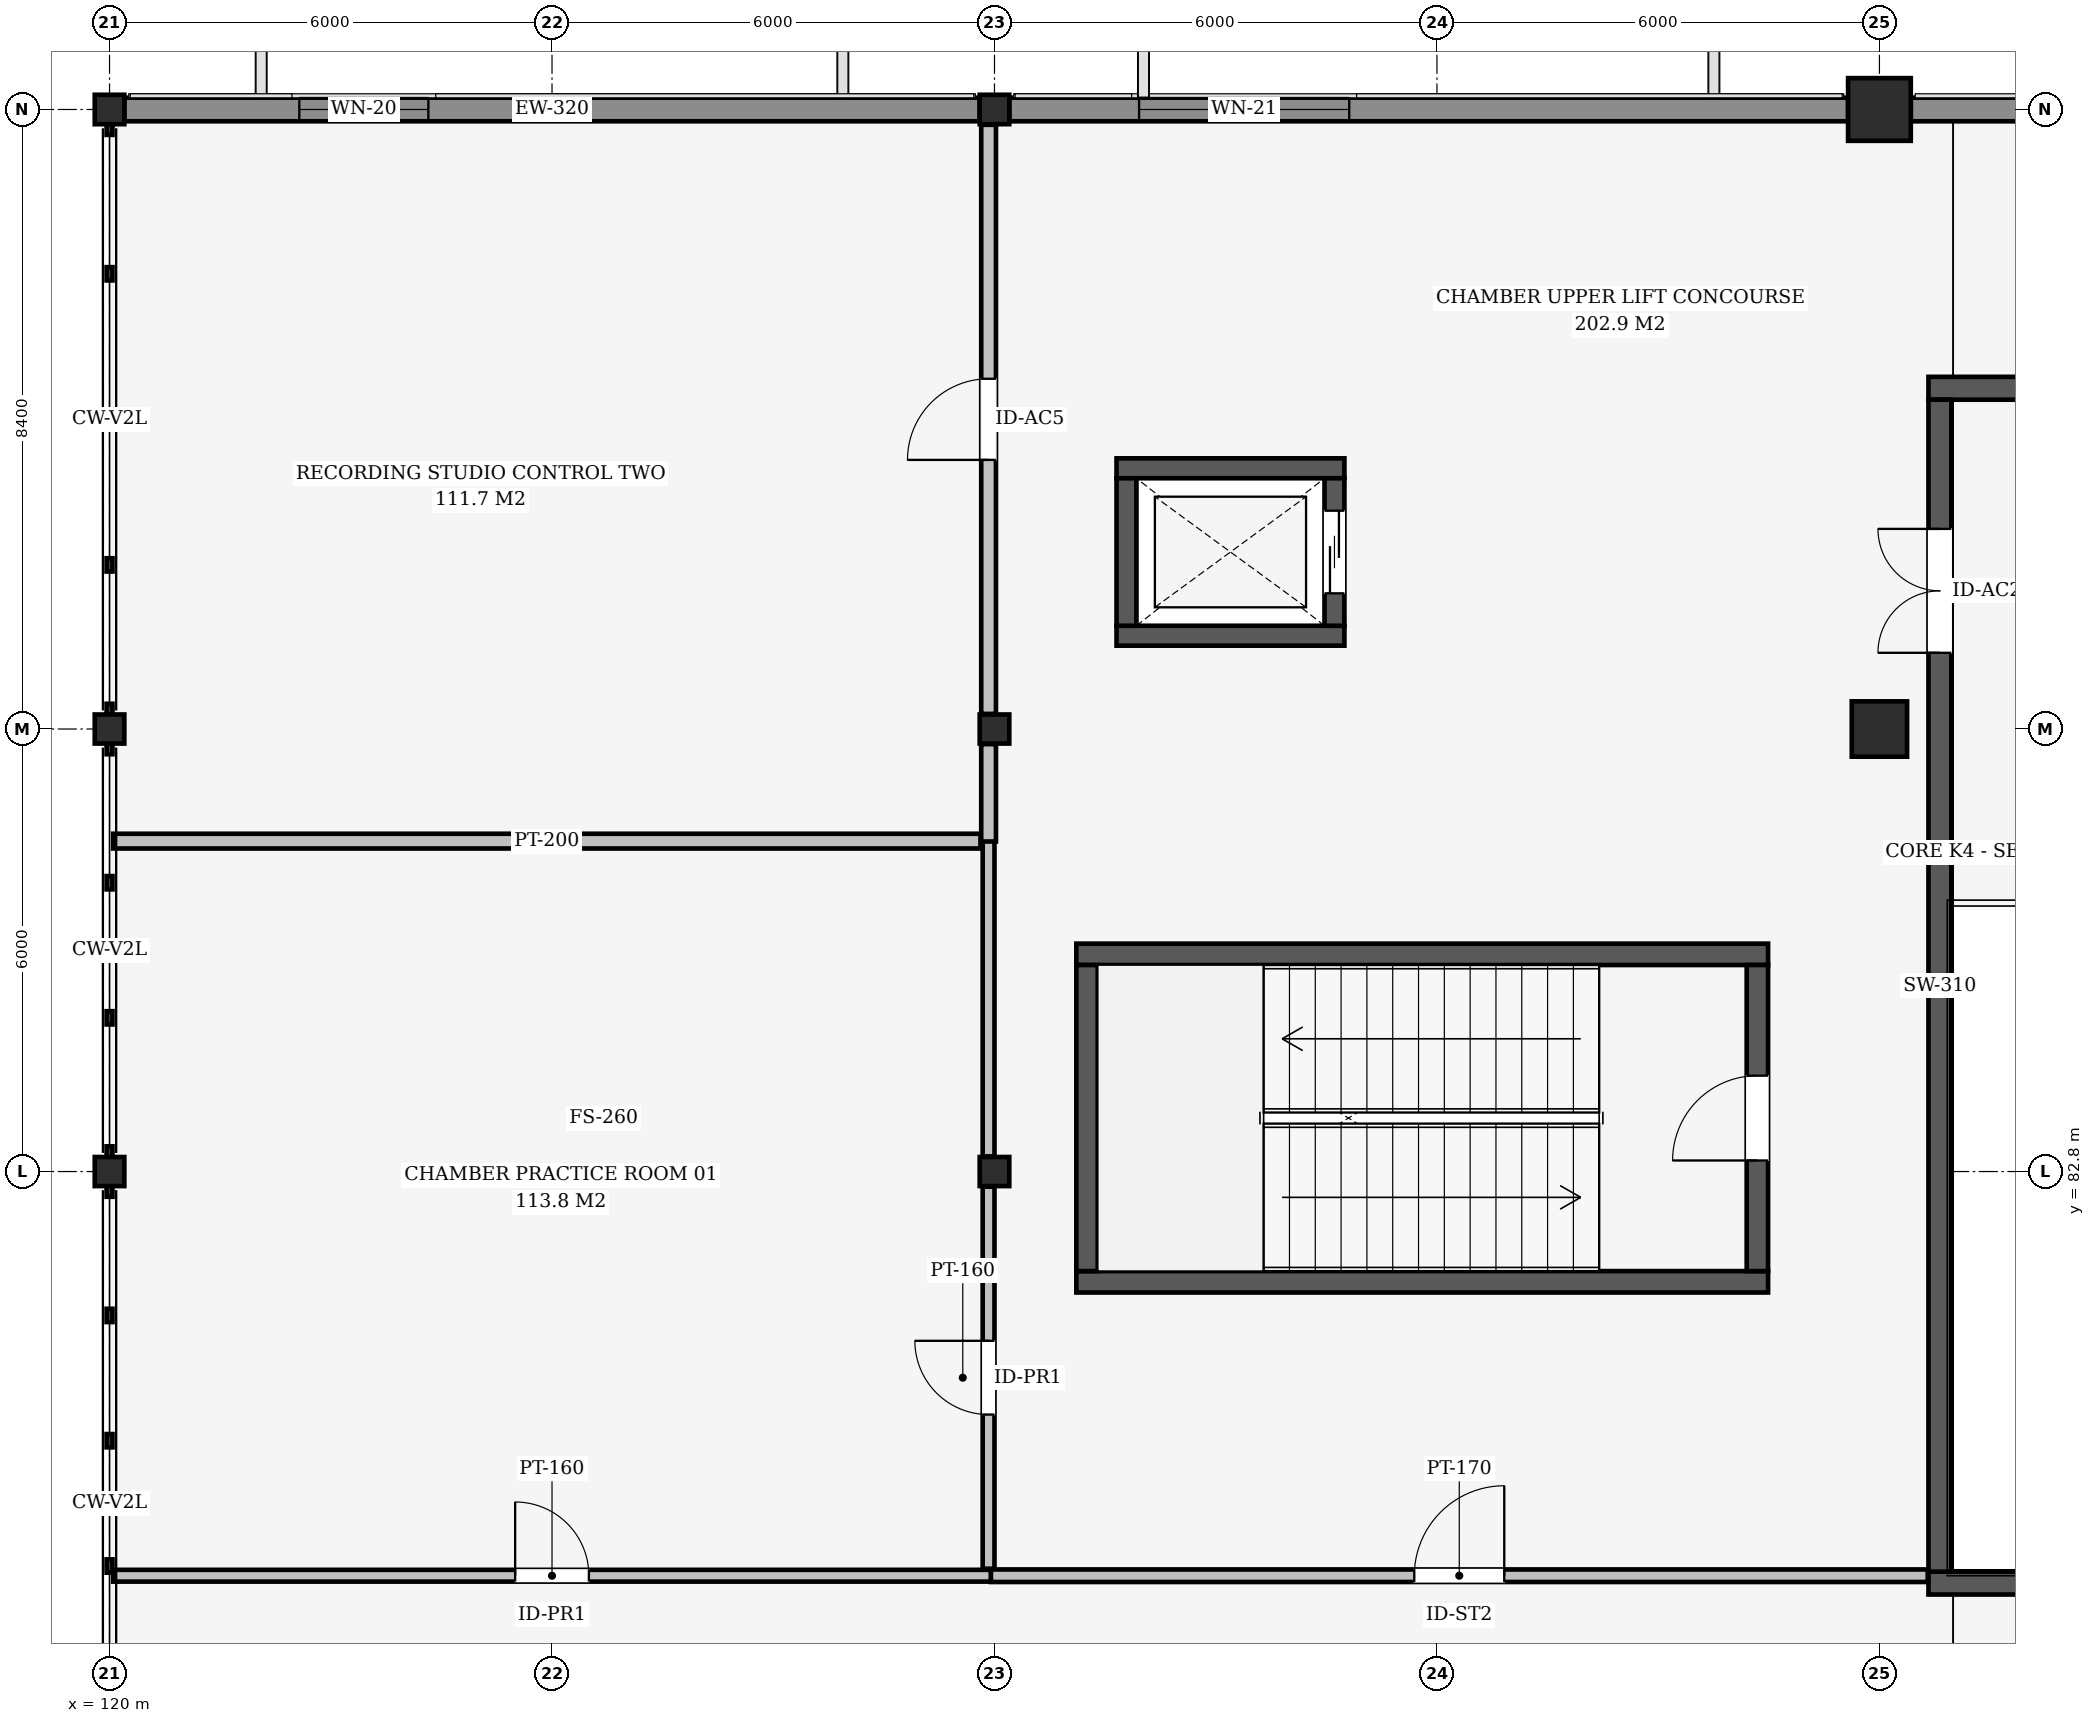
"""IFC4 building model, lengths in metres.
Left out: names, types, materials, properties, quantities, classifications, styles, units other than length and angle.
Written with IfcOpenShell. Run it as: python <this file> out.ifc"""

import sys

from ifc_helpers import new_model, si_unit, direction, frame, frame_2d, origin, origin_2d, place, context, subcontext, project, spatial, rectangle, i_section, extrude, element, fill, save


model = new_model("IFC4")
c1 = context("Model", 3, precision=1e-05, world=origin(), true_north=direction((0.0, 1.0)))
c2 = subcontext(c1, "Body", "Model", "MODEL_VIEW")
j1 = project(units=[si_unit("LENGTHUNIT", "METRE"), si_unit("PLANEANGLEUNIT", "RADIAN")], contexts=[c1])
p1 = place(None, origin())
s1 = spatial("IfcSite", under=j1, at=p1, CompositionType="ELEMENT")
p2 = place(p1, origin())
s2 = spatial("IfcBuilding", under=s1, at=p2, CompositionType="ELEMENT")
p3 = place(p2, frame((0.0, 0.0, 4.8)))
s3 = spatial("IfcBuildingStorey", under=s2, at=p3, CompositionType="ELEMENT", Elevation=4.8)
for number, where, z_axis, x_axis in (
    (1, (120.0, 82.8, 0.0), (0.0, 0.0, 1.0), (1.0, 0.0, 0.0)),
    (2, (120.0, 88.8, 0.0), (0.0, 0.0, 1.0), (1.0, 0.0, 0.0)),
):
    element("IfcColumn", number, at=place(p3, frame(where, z_axis=z_axis, x_axis=x_axis)), inside=s3, PredefinedType="COLUMN", context=c2, shape_type="SweptSolid", body=[
        extrude(i_section(OverallWidth=0.401, OverallDepth=0.394, WebThickness=0.023, FlangeThickness=0.037, at=origin_2d()), origin(), (0.0, 0.0, 1.0), 4.5),
    ])
p4 = place(p3, frame((120.0, 97.2, 0.0), z_axis=(0.0, 0.0, 1.0), x_axis=(1.0, 0.0, 0.0)))
e3 = element("IfcColumn", 3, at=p4, inside=s3, PredefinedType="COLUMN", context=c2, shape_type="SweptSolid", body=[
    extrude(i_section(OverallWidth=0.401, OverallDepth=0.399, WebThickness=0.025, FlangeThickness=0.04, at=origin_2d()), origin(), (0.0, 0.0, 1.0), 4.5),
])
for number, where, z_axis, x_axis in (
    (4, (132.0, 82.8, 0.0), (0.0, 0.0, 1.0), (1.0, 0.0, 0.0)),
    (5, (132.0, 88.8, 0.0), (0.0, 0.0, 1.0), (1.0, 0.0, 0.0)),
):
    element("IfcColumn", number, at=place(p3, frame(where, z_axis=z_axis, x_axis=x_axis)), inside=s3, PredefinedType="COLUMN", context=c2, shape_type="SweptSolid", body=[
        extrude(i_section(OverallWidth=0.401, OverallDepth=0.394, WebThickness=0.023, FlangeThickness=0.037, at=origin_2d()), origin(), (0.0, 0.0, 1.0), 4.5),
    ])
p5 = place(p3, frame((132.0, 97.2, 0.0), z_axis=(0.0, 0.0, 1.0), x_axis=(1.0, 0.0, 0.0)))
e6 = element("IfcColumn", 6, at=p5, inside=s3, PredefinedType="COLUMN", context=c2, shape_type="SweptSolid", body=[
    extrude(i_section(OverallWidth=0.401, OverallDepth=0.399, WebThickness=0.025, FlangeThickness=0.04, at=origin_2d()), origin(), (0.0, 0.0, 1.0), 4.5),
])
p6 = place(p3, frame((144.0, 88.8, 0.0), z_axis=(0.0, 0.0, 1.0), x_axis=(1.0, 0.0, 0.0)))
e7 = element("IfcColumn", 7, at=p6, inside=s3, PredefinedType="COLUMN", context=c2, shape_type="SweptSolid", body=[
    extrude(rectangle(XDim=0.75, YDim=0.75, at=origin_2d()), origin(), (0.0, 0.0, 1.0), 4.5),
])
p7 = place(p3, frame((144.0, 97.2, 0.0), z_axis=(0.0, 0.0, 1.0), x_axis=(1.0, 0.0, 0.0)))
e8 = element("IfcColumn", 8, at=p7, inside=s3, PredefinedType="COLUMN", context=c2, shape_type="SweptSolid", body=[
    extrude(rectangle(XDim=0.85, YDim=0.85, at=origin_2d()), origin(), (0.0, 0.0, 1.0), 4.5),
])
for number, where, z_axis, x_axis in (
    (9, (144.665, 77.22, 0.0), (0.0, 0.0, 1.0), (1.0, 0.0, 0.0)),
    (10, (144.665, 93.42, 0.0), (0.0, 0.0, 1.0), (1.0, 0.0, 0.0)),
):
    element("IfcWall", number, at=place(p3, frame(where, z_axis=z_axis, x_axis=x_axis)), inside=s3, PredefinedType="SHEAR", context=c2, shape_type="SweptSolid", body=[
        extrude(rectangle(XDim=12.67, YDim=0.31, at=frame_2d((6.335, 0.0))), origin(), (0.0, 0.0, 1.0), 4.24),
    ])
p8 = place(p3, frame((144.82, 77.375, 0.0), z_axis=(0.0, 0.0, 1.0), x_axis=(0.0, 1.0, 0.0)))
e11 = element("IfcWall", 11, at=p8, inside=s3, PredefinedType="SHEAR", context=c2, shape_type="SweptSolid", body=[
    extrude(rectangle(XDim=15.89, YDim=0.31, at=frame_2d((7.945, 0.0))), origin(), (0.0, 0.0, 1.0), 4.24),
])
p9 = place(p8, frame((12.458, 0.0, 0.0)))
e12 = element("IfcOpeningElement", 12, at=p9, cuts=e11, PredefinedType="OPENING", context=c2, shape_type="SweptSolid", body=[
    extrude(rectangle(XDim=1.68, YDim=2.32, at=frame_2d((0.84, 1.16))), frame((0.0, 0.165, 0.0), z_axis=(0.0, -1.0, 0.0), x_axis=(1.0, 0.0, 0.0)), (0.0, 0.0, 1.0), 0.33),
])
p10 = place(p3, frame((120.2, 97.2, 0.0), z_axis=(0.0, 0.0, 1.0), x_axis=(1.0, 0.0, 0.0)))
e13 = element("IfcWall", 13, at=p10, inside=s3, PredefinedType="SOLIDWALL", context=c2, shape_type="SweptSolid", body=[
    extrude(rectangle(XDim=11.599, YDim=0.32, at=frame_2d((5.8, 0.0))), origin(), (0.0, 0.0, 1.0), 3.684),
])
p11 = place(p10, frame((2.373, 0.0, 0.85)))
e14 = element("IfcOpeningElement", 14, at=p11, cuts=e13, PredefinedType="OPENING", context=c2, shape_type="SweptSolid", body=[
    extrude(rectangle(XDim=1.75, YDim=1.45, at=frame_2d((0.875, 0.725))), frame((0.0, 0.17, 0.0), z_axis=(0.0, -1.0, 0.0), x_axis=(1.0, 0.0, 0.0)), (0.0, 0.0, 1.0), 0.34),
])
p12 = place(p3, frame((132.2, 97.2, 0.0), z_axis=(0.0, 0.0, 1.0), x_axis=(1.0, 0.0, 0.0)))
e15 = element("IfcWall", 15, at=p12, inside=s3, PredefinedType="SOLIDWALL", context=c2, shape_type="SweptSolid", body=[
    extrude(rectangle(XDim=11.375, YDim=0.32, at=frame_2d((5.687, 0.0))), origin(), (0.0, 0.0, 1.0), 3.684),
])
p13 = place(p12, frame((1.76, 0.0, 0.6)))
e16 = element("IfcOpeningElement", 16, at=p13, cuts=e15, PredefinedType="OPENING", context=c2, shape_type="SweptSolid", body=[
    extrude(rectangle(XDim=2.85, YDim=2.0, at=frame_2d((1.425, 1.0))), frame((0.0, 0.17, 0.0), z_axis=(0.0, -1.0, 0.0), x_axis=(1.0, 0.0, 0.0)), (0.0, 0.0, 1.0), 0.34),
])
p14 = place(p3, frame((144.425, 97.2, 0.0), z_axis=(0.0, 0.0, 1.0), x_axis=(1.0, 0.0, 0.0)))
e17 = element("IfcWall", 17, at=p14, inside=s3, PredefinedType="SOLIDWALL", context=c2, shape_type="SweptSolid", body=[
    extrude(rectangle(XDim=11.15, YDim=0.32, at=frame_2d((5.575, 0.0))), origin(), (0.0, 0.0, 1.0), 3.684),
])
for number, where, z_axis, x_axis in (
    (18, (133.11, 81.305, 0.0), (0.0, 0.0, 1.0), (1.0, 0.0, 0.0)),
    (19, (133.11, 85.745, 0.0), (0.0, 0.0, 1.0), (1.0, 0.0, 0.0)),
):
    element("IfcWall", number, at=place(p3, frame(where, z_axis=z_axis, x_axis=x_axis)), inside=s3, PredefinedType="SHEAR", context=c2, shape_type="SweptSolid", body=[
        extrude(rectangle(XDim=9.38, YDim=0.29, at=frame_2d((4.69, 0.0))), origin(), (0.0, 0.0, 1.0), 4.24),
    ])
p15 = place(p3, frame((133.255, 81.45, 0.0), z_axis=(0.0, 0.0, 1.0), x_axis=(0.0, 1.0, 0.0)))
e20 = element("IfcWall", 20, at=p15, inside=s3, PredefinedType="SHEAR", context=c2, shape_type="SweptSolid", body=[
    extrude(rectangle(XDim=4.15, YDim=0.29, at=frame_2d((2.075, 0.0))), origin(), (0.0, 0.0, 1.0), 4.24),
])
p16 = place(p3, frame((142.345, 81.45, 0.0), z_axis=(0.0, 0.0, 1.0), x_axis=(0.0, 1.0, 0.0)))
e21 = element("IfcWall", 21, at=p16, inside=s3, PredefinedType="SHEAR", context=c2, shape_type="SweptSolid", body=[
    extrude(rectangle(XDim=4.15, YDim=0.29, at=frame_2d((2.075, 0.0))), origin(), (0.0, 0.0, 1.0), 4.24),
])
p17 = place(p16, frame((1.5, 0.0, 0.0)))
e22 = element("IfcOpeningElement", 22, at=p17, cuts=e21, PredefinedType="OPENING", context=c2, shape_type="SweptSolid", body=[
    extrude(rectangle(XDim=1.15, YDim=2.15, at=frame_2d((0.575, 1.075))), frame((0.0, 0.155, 0.0), z_axis=(0.0, -1.0, 0.0), x_axis=(1.0, 0.0, 0.0)), (0.0, 0.0, 1.0), 0.31),
])
for number, where, z_axis, x_axis in (
    (23, (133.655, 90.065, 0.0), (0.0, 0.0, 1.0), (1.0, 0.0, 0.0)),
    (24, (133.655, 92.335, 0.0), (0.0, 0.0, 1.0), (1.0, 0.0, 0.0)),
):
    element("IfcWall", number, at=place(p3, frame(where, z_axis=z_axis, x_axis=x_axis)), inside=s3, PredefinedType="SHEAR", context=c2, shape_type="SweptSolid", body=[
        extrude(rectangle(XDim=3.09, YDim=0.27, at=frame_2d((1.545, 0.0))), origin(), (0.0, 0.0, 1.0), 4.24),
    ])
p18 = place(p3, frame((133.79, 90.2, 0.0), z_axis=(0.0, 0.0, 1.0), x_axis=(0.0, 1.0, 0.0)))
e25 = element("IfcWall", 25, at=p18, inside=s3, PredefinedType="SHEAR", context=c2, shape_type="SweptSolid", body=[
    extrude(rectangle(XDim=2.0, YDim=0.27, at=frame_2d((1.0, 0.0))), origin(), (0.0, 0.0, 1.0), 4.24),
])
p19 = place(p3, frame((136.61, 90.2, 0.0), z_axis=(0.0, 0.0, 1.0), x_axis=(0.0, 1.0, 0.0)))
e26 = element("IfcWall", 26, at=p19, inside=s3, PredefinedType="SHEAR", context=c2, shape_type="SweptSolid", body=[
    extrude(rectangle(XDim=2.0, YDim=0.27, at=frame_2d((1.0, 0.0))), origin(), (0.0, 0.0, 1.0), 4.24),
])
p20 = place(p19, frame((0.44, 0.0, 0.0)))
e27 = element("IfcOpeningElement", 27, at=p20, cuts=e26, PredefinedType="OPENING", context=c2, shape_type="SweptSolid", body=[
    extrude(rectangle(XDim=1.12, YDim=2.15, at=frame_2d((0.56, 1.075))), frame((0.0, 0.145, 0.0), z_axis=(0.0, -1.0, 0.0), x_axis=(1.0, 0.0, 0.0)), (0.0, 0.0, 1.0), 0.29),
])
p21 = place(p3, frame((131.95, 77.32, 0.0), z_axis=(0.0, 0.0, 1.0), x_axis=(1.0, 0.0, 0.0)))
e28 = element("IfcWall", 28, at=p21, inside=s3, PredefinedType="PARTITIONING", context=c2, shape_type="SweptSolid", body=[
    extrude(rectangle(XDim=12.705, YDim=0.17, at=frame_2d((6.353, 0.0))), origin(), (0.0, 0.0, 1.0), 4.22),
])
p22 = place(p21, frame((5.742, 0.0, 0.0)))
e29 = element("IfcOpeningElement", 29, at=p22, cuts=e28, PredefinedType="OPENING", context=c2, shape_type="SweptSolid", body=[
    extrude(rectangle(XDim=1.22, YDim=2.18, at=frame_2d((0.61, 1.09))), frame((0.0, 0.095, 0.0), z_axis=(0.0, -1.0, 0.0), x_axis=(1.0, 0.0, 0.0)), (0.0, 0.0, 1.0), 0.19),
])
p23 = place(p3, frame((120.05, 77.32, 0.0), z_axis=(0.0, 0.0, 1.0), x_axis=(1.0, 0.0, 0.0)))
e30 = element("IfcWall", 30, at=p23, inside=s3, PredefinedType="PARTITIONING", context=c2, shape_type="SweptSolid", body=[
    extrude(rectangle(XDim=11.9, YDim=0.16, at=frame_2d((5.95, 0.0))), origin(), (0.0, 0.0, 1.0), 4.22),
])
p24 = place(p23, frame((5.45, 0.0, 0.0)))
e31 = element("IfcOpeningElement", 31, at=p24, cuts=e30, PredefinedType="OPENING", context=c2, shape_type="SweptSolid", body=[
    extrude(rectangle(XDim=1.0, YDim=2.16, at=frame_2d((0.5, 1.08))), frame((0.0, 0.09, 0.0), z_axis=(0.0, -1.0, 0.0), x_axis=(1.0, 0.0, 0.0)), (0.0, 0.0, 1.0), 0.18),
])
p25 = place(p3, frame((131.92, 77.415, 0.0), z_axis=(0.0, 0.0, 1.0), x_axis=(0.0, 1.0, 0.0)))
e32 = element("IfcWall", 32, at=p25, inside=s3, PredefinedType="PARTITIONING", context=c2, shape_type="SweptSolid", body=[
    extrude(rectangle(XDim=5.18, YDim=0.16, at=frame_2d((2.59, 0.0))), origin(), (0.0, 0.0, 1.0), 3.609),
])
p26 = place(p25, frame((2.09, 0.0, 0.0)))
e33 = element("IfcOpeningElement", 33, at=p26, cuts=e32, PredefinedType="OPENING", context=c2, shape_type="SweptSolid", body=[
    extrude(rectangle(XDim=1.0, YDim=2.16, at=frame_2d((0.5, 1.08))), frame((0.0, 0.09, 0.0), z_axis=(0.0, -1.0, 0.0), x_axis=(1.0, 0.0, 0.0)), (0.0, 0.0, 1.0), 0.18),
])
p27 = place(p3, frame((131.92, 83.005, 0.0), z_axis=(0.0, 0.0, 1.0), x_axis=(0.0, 1.0, 0.0)))
e34 = element("IfcWall", 34, at=p27, inside=s3, PredefinedType="PARTITIONING", context=c2, shape_type="SweptSolid", body=[
    extrude(rectangle(XDim=4.28, YDim=0.16, at=frame_2d((2.14, 0.0))), origin(), (0.0, 0.0, 1.0), 3.608),
])
p28 = place(p3, frame((131.92, 87.275, 0.0), z_axis=(0.0, 0.0, 1.0), x_axis=(0.0, 1.0, 0.0)))
e35 = element("IfcWall", 35, at=p28, inside=s3, PredefinedType="PARTITIONING", context=c2, shape_type="SweptSolid", body=[
    extrude(rectangle(XDim=1.32, YDim=0.2, at=frame_2d((0.66, 0.0))), origin(), (0.0, 0.0, 1.0), 3.608),
])
p29 = place(p3, frame((131.92, 89.005, 0.0), z_axis=(0.0, 0.0, 1.0), x_axis=(0.0, 1.0, 0.0)))
e36 = element("IfcWall", 36, at=p29, inside=s3, PredefinedType="PARTITIONING", context=c2, shape_type="SweptSolid", body=[
    extrude(rectangle(XDim=7.988, YDim=0.2, at=frame_2d((3.994, 0.0))), origin(), (0.0, 0.0, 1.0), 3.608),
])
p30 = place(p29, frame((3.444, 0.0, 0.0)))
e37 = element("IfcOpeningElement", 37, at=p30, cuts=e36, PredefinedType="OPENING", context=c2, shape_type="SweptSolid", body=[
    extrude(rectangle(XDim=1.1, YDim=2.26, at=frame_2d((0.55, 1.13))), frame((0.0, 0.11, 0.0), z_axis=(0.0, -1.0, 0.0), x_axis=(1.0, 0.0, 0.0)), (0.0, 0.0, 1.0), 0.22),
])
p31 = place(p3, frame((120.05, 87.28, 0.0), z_axis=(0.0, 0.0, 1.0), x_axis=(1.0, 0.0, 0.0)))
e38 = element("IfcWall", 38, at=p31, inside=s3, PredefinedType="PARTITIONING", context=c2, shape_type="SweptSolid", body=[
    extrude(rectangle(XDim=11.76, YDim=0.2, at=frame_2d((5.88, 0.0))), origin(), (0.0, 0.0, 1.0), 4.22),
])
p32 = place(p11, origin())
e39 = element("IfcWindow", 39, at=p32, inside=s3, PartitioningType="SINGLE_PANEL", PredefinedType="WINDOW", context=c2, shape_type="SweptSolid", body=[
    extrude(rectangle(XDim=1.75, YDim=1.45, at=frame_2d((0.875, 0.725))), frame((0.0, 0.03, 0.0), z_axis=(0.0, -1.0, 0.0), x_axis=(1.0, 0.0, 0.0)), (0.0, 0.0, 1.0), 0.06),
])
fill(e14, e39)
p33 = place(p13, origin())
e40 = element("IfcWindow", 40, at=p33, inside=s3, PartitioningType="SINGLE_PANEL", PredefinedType="WINDOW", context=c2, shape_type="SweptSolid", body=[
    extrude(rectangle(XDim=2.85, YDim=2.0, at=frame_2d((1.425, 1.0))), frame((0.0, 0.03, 0.0), z_axis=(0.0, -1.0, 0.0), x_axis=(1.0, 0.0, 0.0)), (0.0, 0.0, 1.0), 0.06),
])
fill(e16, e40)
p34 = place(p17, origin())
e41 = element("IfcDoor", 41, at=p34, inside=s3, OperationType="SINGLE_SWING_LEFT", PredefinedType="DOOR", context=c2, shape_type="SweptSolid", body=[
    extrude(rectangle(XDim=1.15, YDim=2.15, at=frame_2d((0.575, 1.075))), frame((0.0, 0.025, 0.0), z_axis=(0.0, -1.0, 0.0), x_axis=(1.0, 0.0, 0.0)), (0.0, 0.0, 1.0), 0.05),
])
fill(e22, e41)
p35 = place(p20, origin())
e42 = element("IfcDoor", 42, at=p35, inside=s3, OperationType="SLIDING_TO_LEFT", PredefinedType="DOOR", context=c2, shape_type="SweptSolid", body=[
    extrude(rectangle(XDim=1.12, YDim=2.15, at=frame_2d((0.56, 1.075))), frame((0.0, 0.025, 0.0), z_axis=(0.0, -1.0, 0.0), x_axis=(1.0, 0.0, 0.0)), (0.0, 0.0, 1.0), 0.05),
])
fill(e27, e42)
p36 = place(p22, origin())
e43 = element("IfcDoor", 43, at=p36, inside=s3, OperationType="SINGLE_SWING_RIGHT", PredefinedType="DOOR", context=c2, shape_type="SweptSolid", body=[
    extrude(rectangle(XDim=1.22, YDim=2.18, at=frame_2d((0.61, 1.09))), frame((0.0, 0.025, 0.0), z_axis=(0.0, -1.0, 0.0), x_axis=(1.0, 0.0, 0.0)), (0.0, 0.0, 1.0), 0.05),
])
fill(e29, e43)
p37 = place(p24, origin())
e44 = element("IfcDoor", 44, at=p37, inside=s3, OperationType="SINGLE_SWING_LEFT", PredefinedType="DOOR", context=c2, shape_type="SweptSolid", body=[
    extrude(rectangle(XDim=1.0, YDim=2.16, at=frame_2d((0.5, 1.08))), frame((0.0, 0.025, 0.0), z_axis=(0.0, -1.0, 0.0), x_axis=(1.0, 0.0, 0.0)), (0.0, 0.0, 1.0), 0.05),
])
fill(e31, e44)
p38 = place(p9, origin())
e45 = element("IfcDoor", 45, at=p38, inside=s3, OperationType="DOUBLE_DOOR_SINGLE_SWING", PredefinedType="DOOR", context=c2, shape_type="SweptSolid", body=[
    extrude(rectangle(XDim=1.68, YDim=2.32, at=frame_2d((0.84, 1.16))), frame((0.0, 0.025, 0.0), z_axis=(0.0, -1.0, 0.0), x_axis=(1.0, 0.0, 0.0)), (0.0, 0.0, 1.0), 0.05),
])
fill(e12, e45)
p39 = place(p26, origin())
e46 = element("IfcDoor", 46, at=p39, inside=s3, OperationType="SINGLE_SWING_RIGHT", PredefinedType="DOOR", context=c2, shape_type="SweptSolid", body=[
    extrude(rectangle(XDim=1.0, YDim=2.16, at=frame_2d((0.5, 1.08))), frame((0.0, 0.025, 0.0), z_axis=(0.0, -1.0, 0.0), x_axis=(1.0, 0.0, 0.0)), (0.0, 0.0, 1.0), 0.05),
])
fill(e33, e46)
p40 = place(p30, origin())
e47 = element("IfcDoor", 47, at=p40, inside=s3, OperationType="SINGLE_SWING_LEFT", PredefinedType="DOOR", context=c2, shape_type="SweptSolid", body=[
    extrude(rectangle(XDim=1.1, YDim=2.26, at=frame_2d((0.55, 1.13))), frame((0.0, 0.025, 0.0), z_axis=(0.0, -1.0, 0.0), x_axis=(1.0, 0.0, 0.0)), (0.0, 0.0, 1.0), 0.05),
])
fill(e37, e47)
save(model, sys.argv[1])
